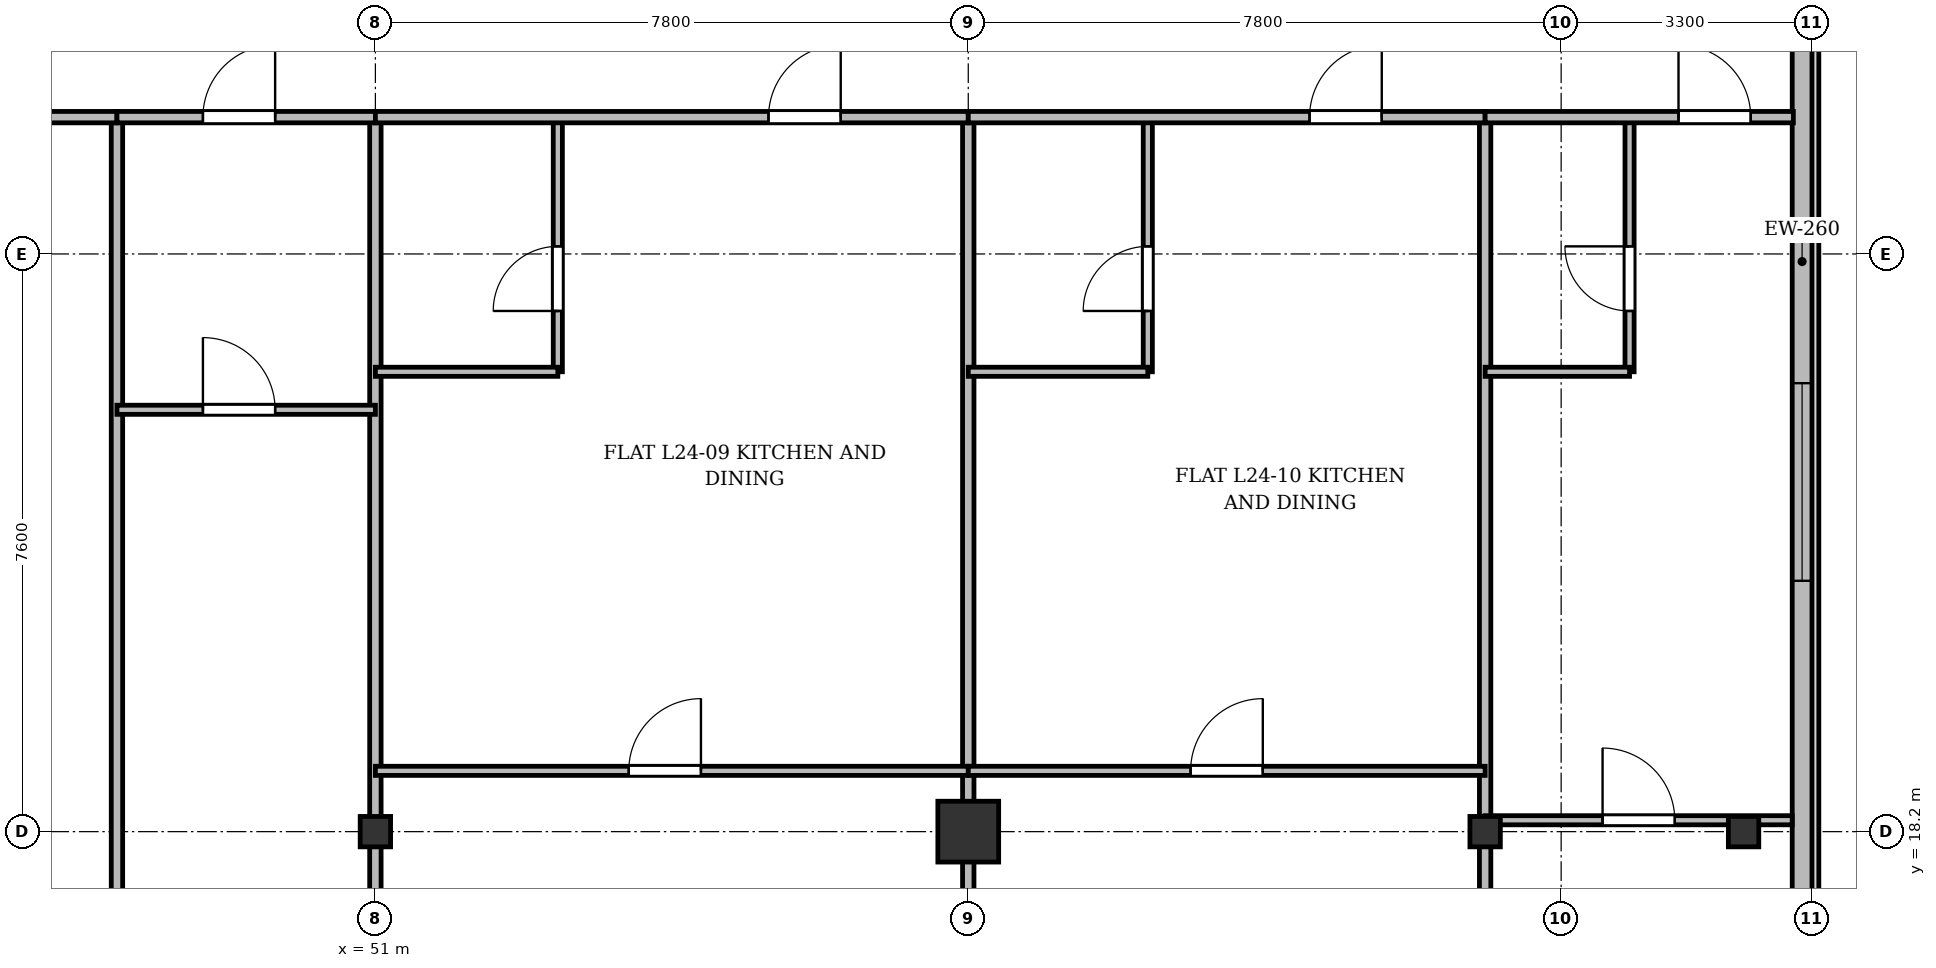
"""IFC4 building model, lengths in metres.
Left out: names, types, materials, properties, quantities, classifications, styles, units other than length and angle.
Written with IfcOpenShell. Run it as: python <this file> out.ifc"""

import sys

from ifc_helpers import new_model, si_unit, direction, frame, frame_2d, origin, origin_2d, place, context, subcontext, project, spatial, rectangle, i_section, extrude, source, transform, mapped, element, fill, save


model = new_model("IFC4")
c1 = context("Model", 3, precision=1e-05, world=origin(), true_north=direction((0.0, 1.0)))
c2 = subcontext(c1, "Body", "Model", "MODEL_VIEW")
j1 = project(units=[si_unit("LENGTHUNIT", "METRE"), si_unit("PLANEANGLEUNIT", "RADIAN")], contexts=[c1])
p1 = place(None, origin())
s1 = spatial("IfcSite", under=j1, at=p1, CompositionType="ELEMENT")
p2 = place(p1, origin())
s2 = spatial("IfcBuilding", under=s1, at=p2, CompositionType="ELEMENT")
p3 = place(p2, frame((0.0, 0.0, 96.1)))
s3 = spatial("IfcBuildingStorey", under=s2, at=p3, CompositionType="ELEMENT", Elevation=96.1)
m1 = source(origin(), c2, "Body", "SweptSolid", [
    extrude(i_section(OverallWidth=0.4, OverallDepth=0.4, WebThickness=0.022, FlangeThickness=0.035, at=origin_2d()), origin(), (0.0, 0.0, 1.0), 3.6),
])
p4 = place(p3, frame((51.0, 18.2, 0.0), z_axis=(0.0, 0.0, 1.0), x_axis=(1.0, 0.0, 0.0)))
e1 = element("IfcColumn", 1, at=p4, inside=s3, PredefinedType="COLUMN", context=c2, shape_type="MappedRepresentation", body=[
    mapped(m1, transform((0.0, 0.0, 0.0), x_axis=(1.0, 0.0, 0.0), y_axis=(0.0, 1.0, 0.0), z_axis=(0.0, 0.0, 1.0), scale=1.0)),
])
m2 = source(origin(), c2, "Body", "SweptSolid", [
    extrude(rectangle(XDim=0.8, YDim=0.8, at=origin_2d()), origin(), (0.0, 0.0, 1.0), 3.6),
])
p5 = place(p3, frame((58.8, 18.2, 0.0), z_axis=(0.0, 0.0, 1.0), x_axis=(1.0, 0.0, 0.0)))
e2 = element("IfcColumn", 2, at=p5, inside=s3, PredefinedType="COLUMN", context=c2, shape_type="MappedRepresentation", body=[
    mapped(m2, transform((0.0, 0.0, 0.0), x_axis=(1.0, 0.0, 0.0), y_axis=(0.0, 1.0, 0.0), z_axis=(0.0, 0.0, 1.0), scale=1.0)),
])
for number, where, z_axis, x_axis in (
    (3, (65.6, 18.2, 0.0), (0.0, 0.0, 1.0), (1.0, 0.0, 0.0)),
    (4, (69.0, 18.2, 0.0), (0.0, 0.0, 1.0), (1.0, 0.0, 0.0)),
):
    element("IfcColumn", number, at=place(p3, frame(where, z_axis=z_axis, x_axis=x_axis)), inside=s3, PredefinedType="COLUMN", context=c2, shape_type="MappedRepresentation", body=[
        mapped(m1, transform((0.0, 0.0, 0.0), x_axis=(1.0, 0.0, 0.0), y_axis=(0.0, 1.0, 0.0), z_axis=(0.0, 0.0, 1.0), scale=1.0)),
    ])
p6 = place(p3, frame((69.77, 45.5, 0.0), z_axis=(0.0, 0.0, 1.0), x_axis=(0.0, -1.0, 0.0)))
e5 = element("IfcWall", 5, at=p6, inside=s3, PredefinedType="SOLIDWALL", context=c2, shape_type="SweptSolid", body=[
    extrude(rectangle(XDim=39.6, YDim=0.26, at=frame_2d((19.8, 0.0))), origin(), (0.0, 0.0, 1.0), 3.34),
])
p7 = place(p6, frame((36.95, 0.0, 0.92)))
e6 = element("IfcOpeningElement", 6, at=p7, cuts=e5, PredefinedType="OPENING", context=c2, shape_type="SweptSolid", body=[
    extrude(rectangle(XDim=1.2, YDim=1.65, at=frame_2d((0.6, 0.825))), frame((0.0, 0.14, 0.0), z_axis=(0.0, -1.0, 0.0), x_axis=(1.0, 0.0, 0.0)), (0.0, 0.0, 1.0), 0.28),
])
p8 = place(p6, frame((32.8, 0.0, 0.92)))
e7 = element("IfcOpeningElement", 7, at=p8, cuts=e5, PredefinedType="OPENING", context=c2, shape_type="SweptSolid", body=[
    extrude(rectangle(XDim=2.6, YDim=1.9, at=frame_2d((1.3, 0.95))), frame((0.0, 0.14, 0.0), z_axis=(0.0, -1.0, 0.0), x_axis=(1.0, 0.0, 0.0)), (0.0, 0.0, 1.0), 0.28),
])
p9 = place(p6, frame((28.6, 0.0, 0.92)))
e8 = element("IfcOpeningElement", 8, at=p9, cuts=e5, PredefinedType="OPENING", context=c2, shape_type="SweptSolid", body=[
    extrude(rectangle(XDim=2.6, YDim=1.9, at=frame_2d((1.3, 0.95))), frame((0.0, 0.14, 0.0), z_axis=(0.0, -1.0, 0.0), x_axis=(1.0, 0.0, 0.0)), (0.0, 0.0, 1.0), 0.28),
])
p10 = place(p6, frame((21.4, 0.0, 0.92)))
e9 = element("IfcOpeningElement", 9, at=p10, cuts=e5, PredefinedType="OPENING", context=c2, shape_type="SweptSolid", body=[
    extrude(rectangle(XDim=2.6, YDim=1.9, at=frame_2d((1.3, 0.95))), frame((0.0, 0.14, 0.0), z_axis=(0.0, -1.0, 0.0), x_axis=(1.0, 0.0, 0.0)), (0.0, 0.0, 1.0), 0.28),
])
p11 = place(p6, frame((7.4, 0.0, 0.92)))
e10 = element("IfcOpeningElement", 10, at=p11, cuts=e5, PredefinedType="OPENING", context=c2, shape_type="SweptSolid", body=[
    extrude(rectangle(XDim=2.6, YDim=1.9, at=frame_2d((1.3, 0.95))), frame((0.0, 0.14, 0.0), z_axis=(0.0, -1.0, 0.0), x_axis=(1.0, 0.0, 0.0)), (0.0, 0.0, 1.0), 0.28),
])
p12 = place(p6, frame((4.5, 0.0, 0.92)))
e11 = element("IfcOpeningElement", 11, at=p12, cuts=e5, PredefinedType="OPENING", context=c2, shape_type="SweptSolid", body=[
    extrude(rectangle(XDim=1.2, YDim=1.65, at=frame_2d((0.6, 0.825))), frame((0.0, 0.14, 0.0), z_axis=(0.0, -1.0, 0.0), x_axis=(1.0, 0.0, 0.0)), (0.0, 0.0, 1.0), 0.28),
])
p13 = place(p6, frame((1.15, 0.0, 0.92)))
e12 = element("IfcOpeningElement", 12, at=p13, cuts=e5, PredefinedType="OPENING", context=c2, shape_type="SweptSolid", body=[
    extrude(rectangle(XDim=1.2, YDim=1.65, at=frame_2d((0.6, 0.825))), frame((0.0, 0.14, 0.0), z_axis=(0.0, -1.0, 0.0), x_axis=(1.0, 0.0, 0.0)), (0.0, 0.0, 1.0), 0.28),
])
p14 = place(p3, frame((47.6, 3.145, 0.0), z_axis=(0.0, 0.0, 1.0), x_axis=(0.0, 1.0, 0.0)))
e13 = element("IfcWall", 13, at=p14, inside=s3, PredefinedType="PARTITIONING", context=c2, shape_type="SweptSolid", body=[
    extrude(rectangle(XDim=24.455, YDim=0.15, at=frame_2d((12.228, 0.0))), origin(), (0.0, 0.0, 1.0), 2.752),
])
for number, where, z_axis, x_axis in (
    (14, (51.0, 3.145, 0.0), (0.0, 0.0, 1.0), (0.0, 1.0, 0.0)),
    (15, (58.8, 3.145, 0.0), (0.0, 0.0, 1.0), (0.0, 1.0, 0.0)),
    (16, (65.6, 3.145, 0.0), (0.0, 0.0, 1.0), (0.0, 1.0, 0.0)),
):
    element("IfcWall", number, at=place(p3, frame(where, z_axis=z_axis, x_axis=x_axis)), inside=s3, PredefinedType="PARTITIONING", context=c2, shape_type="SweptSolid", body=[
        extrude(rectangle(XDim=24.455, YDim=0.15, at=frame_2d((12.228, 0.0))), origin(), (0.0, 0.0, 1.0), 2.84),
    ])
p15 = place(p3, frame((43.8, 27.6, 0.0), z_axis=(0.0, 0.0, 1.0), x_axis=(1.0, 0.0, 0.0)))
e17 = element("IfcWall", 17, at=p15, inside=s3, PredefinedType="PARTITIONING", context=c2, shape_type="SweptSolid", body=[
    extrude(rectangle(XDim=3.8, YDim=0.15, at=frame_2d((1.9, 0.0))), origin(), (0.0, 0.0, 1.0), 2.84),
])
p16 = place(p15, frame((1.33, 0.0, 0.0)))
e18 = element("IfcOpeningElement", 18, at=p16, cuts=e17, PredefinedType="OPENING", context=c2, shape_type="SweptSolid", body=[
    extrude(rectangle(XDim=0.95, YDim=2.15, at=frame_2d((0.475, 1.075))), frame((0.0, 0.085, 0.0), z_axis=(0.0, -1.0, 0.0), x_axis=(1.0, 0.0, 0.0)), (0.0, 0.0, 1.0), 0.17),
])
p17 = place(p3, frame((47.6, 27.6, 0.0), z_axis=(0.0, 0.0, 1.0), x_axis=(1.0, 0.0, 0.0)))
e19 = element("IfcWall", 19, at=p17, inside=s3, PredefinedType="PARTITIONING", context=c2, shape_type="SweptSolid", body=[
    extrude(rectangle(XDim=3.4, YDim=0.15, at=frame_2d((1.7, 0.0))), origin(), (0.0, 0.0, 1.0), 2.84),
])
p18 = place(p17, frame((1.131, 0.0, 0.0)))
e20 = element("IfcOpeningElement", 20, at=p18, cuts=e19, PredefinedType="OPENING", context=c2, shape_type="SweptSolid", body=[
    extrude(rectangle(XDim=0.95, YDim=2.15, at=frame_2d((0.475, 1.075))), frame((0.0, 0.085, 0.0), z_axis=(0.0, -1.0, 0.0), x_axis=(1.0, 0.0, 0.0)), (0.0, 0.0, 1.0), 0.17),
])
p19 = place(p3, frame((47.6, 23.75, 0.0), z_axis=(0.0, 0.0, 1.0), x_axis=(1.0, 0.0, 0.0)))
e21 = element("IfcWall", 21, at=p19, inside=s3, PredefinedType="PARTITIONING", context=c2, shape_type="SweptSolid", body=[
    extrude(rectangle(XDim=3.4, YDim=0.12, at=frame_2d((1.7, 0.0))), origin(), (0.0, 0.0, 1.0), 2.84),
])
p20 = place(p19, frame((1.131, 0.0, 0.0)))
e22 = element("IfcOpeningElement", 22, at=p20, cuts=e21, PredefinedType="OPENING", context=c2, shape_type="SweptSolid", body=[
    extrude(rectangle(XDim=0.95, YDim=2.15, at=frame_2d((0.475, 1.075))), frame((0.0, 0.07, 0.0), z_axis=(0.0, -1.0, 0.0), x_axis=(1.0, 0.0, 0.0)), (0.0, 0.0, 1.0), 0.14),
])
p21 = place(p3, frame((51.0, 19.0, 0.0), z_axis=(0.0, 0.0, 1.0), x_axis=(1.0, 0.0, 0.0)))
e23 = element("IfcWall", 23, at=p21, inside=s3, PredefinedType="PARTITIONING", context=c2, shape_type="SweptSolid", body=[
    extrude(rectangle(XDim=7.8, YDim=0.12, at=frame_2d((3.9, 0.0))), origin(), (0.0, 0.0, 1.0), 2.84),
])
p22 = place(p21, frame((3.333, 0.0, 0.0)))
e24 = element("IfcOpeningElement", 24, at=p22, cuts=e23, PredefinedType="OPENING", context=c2, shape_type="SweptSolid", body=[
    extrude(rectangle(XDim=0.95, YDim=2.15, at=frame_2d((0.475, 1.075))), frame((0.0, 0.07, 0.0), z_axis=(0.0, -1.0, 0.0), x_axis=(1.0, 0.0, 0.0)), (0.0, 0.0, 1.0), 0.14),
])
p23 = place(p3, frame((53.4, 24.25, 0.0), z_axis=(0.0, 0.0, 1.0), x_axis=(0.0, 1.0, 0.0)))
e25 = element("IfcWall", 25, at=p23, inside=s3, PredefinedType="PARTITIONING", context=c2, shape_type="SweptSolid", body=[
    extrude(rectangle(XDim=3.35, YDim=0.12, at=frame_2d((1.675, 0.0))), origin(), (0.0, 0.0, 1.0), 2.99),
])
p24 = place(p23, frame((0.8, 0.0, 0.0)))
e26 = element("IfcOpeningElement", 26, at=p24, cuts=e25, PredefinedType="OPENING", context=c2, shape_type="SweptSolid", body=[
    extrude(rectangle(XDim=0.85, YDim=2.1, at=frame_2d((0.425, 1.05))), frame((0.0, 0.07, 0.0), z_axis=(0.0, -1.0, 0.0), x_axis=(1.0, 0.0, 0.0)), (0.0, 0.0, 1.0), 0.14),
])
p25 = place(p3, frame((51.0, 24.25, 0.0), z_axis=(0.0, 0.0, 1.0), x_axis=(1.0, 0.0, 0.0)))
e27 = element("IfcWall", 27, at=p25, inside=s3, PredefinedType="PARTITIONING", context=c2, shape_type="SweptSolid", body=[
    extrude(rectangle(XDim=2.4, YDim=0.12, at=frame_2d((1.2, 0.0))), origin(), (0.0, 0.0, 1.0), 2.84),
])
p26 = place(p3, frame((51.0, 27.6, 0.0), z_axis=(0.0, 0.0, 1.0), x_axis=(1.0, 0.0, 0.0)))
e28 = element("IfcWall", 28, at=p26, inside=s3, PredefinedType="PARTITIONING", context=c2, shape_type="SweptSolid", body=[
    extrude(rectangle(XDim=7.8, YDim=0.15, at=frame_2d((3.9, 0.0))), origin(), (0.0, 0.0, 1.0), 2.84),
])
p27 = place(p26, frame((5.172, 0.0, 0.0)))
e29 = element("IfcOpeningElement", 29, at=p27, cuts=e28, PredefinedType="OPENING", context=c2, shape_type="SweptSolid", body=[
    extrude(rectangle(XDim=0.95, YDim=2.15, at=frame_2d((0.475, 1.075))), frame((0.0, 0.085, 0.0), z_axis=(0.0, -1.0, 0.0), x_axis=(1.0, 0.0, 0.0)), (0.0, 0.0, 1.0), 0.17),
])
p28 = place(p3, frame((58.8, 19.0, 0.0), z_axis=(0.0, 0.0, 1.0), x_axis=(1.0, 0.0, 0.0)))
e30 = element("IfcWall", 30, at=p28, inside=s3, PredefinedType="PARTITIONING", context=c2, shape_type="SweptSolid", body=[
    extrude(rectangle(XDim=6.8, YDim=0.12, at=frame_2d((3.4, 0.0))), origin(), (0.0, 0.0, 1.0), 2.84),
])
p29 = place(p28, frame((2.925, 0.0, 0.0)))
e31 = element("IfcOpeningElement", 31, at=p29, cuts=e30, PredefinedType="OPENING", context=c2, shape_type="SweptSolid", body=[
    extrude(rectangle(XDim=0.95, YDim=2.15, at=frame_2d((0.475, 1.075))), frame((0.0, 0.07, 0.0), z_axis=(0.0, -1.0, 0.0), x_axis=(1.0, 0.0, 0.0)), (0.0, 0.0, 1.0), 0.14),
])
p30 = place(p3, frame((61.162, 24.25, 0.0), z_axis=(0.0, 0.0, 1.0), x_axis=(0.0, 1.0, 0.0)))
e32 = element("IfcWall", 32, at=p30, inside=s3, PredefinedType="PARTITIONING", context=c2, shape_type="SweptSolid", body=[
    extrude(rectangle(XDim=3.35, YDim=0.12, at=frame_2d((1.675, 0.0))), origin(), (0.0, 0.0, 1.0), 2.99),
])
p31 = place(p30, frame((0.8, 0.0, 0.0)))
e33 = element("IfcOpeningElement", 33, at=p31, cuts=e32, PredefinedType="OPENING", context=c2, shape_type="SweptSolid", body=[
    extrude(rectangle(XDim=0.85, YDim=2.1, at=frame_2d((0.425, 1.05))), frame((0.0, 0.07, 0.0), z_axis=(0.0, -1.0, 0.0), x_axis=(1.0, 0.0, 0.0)), (0.0, 0.0, 1.0), 0.14),
])
p32 = place(p3, frame((58.8, 24.25, 0.0), z_axis=(0.0, 0.0, 1.0), x_axis=(1.0, 0.0, 0.0)))
e34 = element("IfcWall", 34, at=p32, inside=s3, PredefinedType="PARTITIONING", context=c2, shape_type="SweptSolid", body=[
    extrude(rectangle(XDim=2.362, YDim=0.12, at=frame_2d((1.181, 0.0))), origin(), (0.0, 0.0, 1.0), 2.84),
])
p33 = place(p3, frame((58.8, 27.6, 0.0), z_axis=(0.0, 0.0, 1.0), x_axis=(1.0, 0.0, 0.0)))
e35 = element("IfcWall", 35, at=p33, inside=s3, PredefinedType="PARTITIONING", context=c2, shape_type="SweptSolid", body=[
    extrude(rectangle(XDim=6.8, YDim=0.15, at=frame_2d((3.4, 0.0))), origin(), (0.0, 0.0, 1.0), 2.84),
])
p34 = place(p33, frame((4.49, 0.0, 0.0)))
e36 = element("IfcOpeningElement", 36, at=p34, cuts=e35, PredefinedType="OPENING", context=c2, shape_type="SweptSolid", body=[
    extrude(rectangle(XDim=0.95, YDim=2.15, at=frame_2d((0.475, 1.075))), frame((0.0, 0.085, 0.0), z_axis=(0.0, -1.0, 0.0), x_axis=(1.0, 0.0, 0.0)), (0.0, 0.0, 1.0), 0.17),
])
p35 = place(p3, frame((65.6, 18.35, 0.0), z_axis=(0.0, 0.0, 1.0), x_axis=(1.0, 0.0, 0.0)))
e37 = element("IfcWall", 37, at=p35, inside=s3, PredefinedType="PARTITIONING", context=c2, shape_type="SweptSolid", body=[
    extrude(rectangle(XDim=4.04, YDim=0.12, at=frame_2d((2.02, 0.0))), origin(), (0.0, 0.0, 1.0), 2.752),
])
p36 = place(p35, frame((1.545, 0.0, 0.0)))
e38 = element("IfcOpeningElement", 38, at=p36, cuts=e37, PredefinedType="OPENING", context=c2, shape_type="SweptSolid", body=[
    extrude(rectangle(XDim=0.95, YDim=2.15, at=frame_2d((0.475, 1.075))), frame((0.0, 0.07, 0.0), z_axis=(0.0, -1.0, 0.0), x_axis=(1.0, 0.0, 0.0)), (0.0, 0.0, 1.0), 0.14),
])
p37 = place(p3, frame((67.5, 24.25, 0.0), z_axis=(0.0, 0.0, 1.0), x_axis=(0.0, 1.0, 0.0)))
e39 = element("IfcWall", 39, at=p37, inside=s3, PredefinedType="PARTITIONING", context=c2, shape_type="SweptSolid", body=[
    extrude(rectangle(XDim=3.35, YDim=0.12, at=frame_2d((1.675, 0.0))), origin(), (0.0, 0.0, 1.0), 2.99),
])
p38 = place(p37, frame((0.8, 0.0, 0.0)))
e40 = element("IfcOpeningElement", 40, at=p38, cuts=e39, PredefinedType="OPENING", context=c2, shape_type="SweptSolid", body=[
    extrude(rectangle(XDim=0.85, YDim=2.1, at=frame_2d((0.425, 1.05))), frame((0.0, 0.07, 0.0), z_axis=(0.0, -1.0, 0.0), x_axis=(1.0, 0.0, 0.0)), (0.0, 0.0, 1.0), 0.14),
])
p39 = place(p3, frame((65.6, 24.25, 0.0), z_axis=(0.0, 0.0, 1.0), x_axis=(1.0, 0.0, 0.0)))
e41 = element("IfcWall", 41, at=p39, inside=s3, PredefinedType="PARTITIONING", context=c2, shape_type="SweptSolid", body=[
    extrude(rectangle(XDim=1.9, YDim=0.12, at=frame_2d((0.95, 0.0))), origin(), (0.0, 0.0, 1.0), 2.84),
])
p40 = place(p3, frame((65.6, 27.6, 0.0), z_axis=(0.0, 0.0, 1.0), x_axis=(1.0, 0.0, 0.0)))
e42 = element("IfcWall", 42, at=p40, inside=s3, PredefinedType="PARTITIONING", context=c2, shape_type="SweptSolid", body=[
    extrude(rectangle(XDim=4.055, YDim=0.15, at=frame_2d((2.027, 0.0))), origin(), (0.0, 0.0, 1.0), 2.84),
])
p41 = place(p40, frame((2.544, 0.0, 0.0)))
e43 = element("IfcOpeningElement", 43, at=p41, cuts=e42, PredefinedType="OPENING", context=c2, shape_type="SweptSolid", body=[
    extrude(rectangle(XDim=0.95, YDim=2.15, at=frame_2d((0.475, 1.075))), frame((0.0, 0.085, 0.0), z_axis=(0.0, -1.0, 0.0), x_axis=(1.0, 0.0, 0.0)), (0.0, 0.0, 1.0), 0.17),
])
m3 = source(origin(), c2, "Body", "SweptSolid", [
    extrude(rectangle(XDim=2.6, YDim=1.9, at=frame_2d((1.3, 0.95))), frame((0.0, 0.03, 0.0), z_axis=(0.0, -1.0, 0.0), x_axis=(1.0, 0.0, 0.0)), (0.0, 0.0, 1.0), 0.06),
])
p42 = place(p10, origin())
e44 = element("IfcWindow", 44, at=p42, inside=s3, PartitioningType="SINGLE_PANEL", PredefinedType="WINDOW", context=c2, shape_type="MappedRepresentation", body=[
    mapped(m3, transform((0.0, 0.0, 0.0), x_axis=(1.0, 0.0, 0.0), y_axis=(0.0, 1.0, 0.0), z_axis=(0.0, 0.0, 1.0), scale=1.0)),
])
fill(e9, e44)
m4 = source(origin(), c2, "Body", "SweptSolid", [
    extrude(rectangle(XDim=0.95, YDim=2.15, at=frame_2d((0.475, 1.075))), frame((0.0, 0.025, 0.0), z_axis=(0.0, -1.0, 0.0), x_axis=(1.0, 0.0, 0.0)), (0.0, 0.0, 1.0), 0.05),
])
p43 = place(p18, origin())
e45 = element("IfcDoor", 45, at=p43, inside=s3, OperationType="SINGLE_SWING_RIGHT", PredefinedType="DOOR", context=c2, shape_type="MappedRepresentation", body=[
    mapped(m4, transform((0.0, 0.0, 0.0), x_axis=(1.0, 0.0, 0.0), y_axis=(0.0, 1.0, 0.0), z_axis=(0.0, 0.0, 1.0), scale=1.0)),
])
fill(e20, e45)
p44 = place(p20, origin())
e46 = element("IfcDoor", 46, at=p44, inside=s3, OperationType="SINGLE_SWING_LEFT", PredefinedType="DOOR", context=c2, shape_type="MappedRepresentation", body=[
    mapped(m4, transform((0.0, 0.0, 0.0), x_axis=(1.0, 0.0, 0.0), y_axis=(0.0, 1.0, 0.0), z_axis=(0.0, 0.0, 1.0), scale=1.0)),
])
fill(e22, e46)
p45 = place(p22, origin())
e47 = element("IfcDoor", 47, at=p45, inside=s3, OperationType="SINGLE_SWING_RIGHT", PredefinedType="DOOR", context=c2, shape_type="MappedRepresentation", body=[
    mapped(m4, transform((0.0, 0.0, 0.0), x_axis=(1.0, 0.0, 0.0), y_axis=(0.0, 1.0, 0.0), z_axis=(0.0, 0.0, 1.0), scale=1.0)),
])
fill(e24, e47)
m5 = source(origin(), c2, "Body", "SweptSolid", [
    extrude(rectangle(XDim=0.85, YDim=2.1, at=frame_2d((0.425, 1.05))), frame((0.0, 0.025, 0.0), z_axis=(0.0, -1.0, 0.0), x_axis=(1.0, 0.0, 0.0)), (0.0, 0.0, 1.0), 0.05),
])
p46 = place(p24, origin())
e48 = element("IfcDoor", 48, at=p46, inside=s3, OperationType="SINGLE_SWING_LEFT", PredefinedType="DOOR", context=c2, shape_type="MappedRepresentation", body=[
    mapped(m5, transform((0.0, 0.0, 0.0), x_axis=(1.0, 0.0, 0.0), y_axis=(0.0, 1.0, 0.0), z_axis=(0.0, 0.0, 1.0), scale=1.0)),
])
fill(e26, e48)
p47 = place(p27, origin())
e49 = element("IfcDoor", 49, at=p47, inside=s3, OperationType="SINGLE_SWING_RIGHT", PredefinedType="DOOR", context=c2, shape_type="MappedRepresentation", body=[
    mapped(m4, transform((0.0, 0.0, 0.0), x_axis=(1.0, 0.0, 0.0), y_axis=(0.0, 1.0, 0.0), z_axis=(0.0, 0.0, 1.0), scale=1.0)),
])
fill(e29, e49)
p48 = place(p29, origin())
e50 = element("IfcDoor", 50, at=p48, inside=s3, OperationType="SINGLE_SWING_RIGHT", PredefinedType="DOOR", context=c2, shape_type="MappedRepresentation", body=[
    mapped(m4, transform((0.0, 0.0, 0.0), x_axis=(1.0, 0.0, 0.0), y_axis=(0.0, 1.0, 0.0), z_axis=(0.0, 0.0, 1.0), scale=1.0)),
])
fill(e31, e50)
p49 = place(p31, origin())
e51 = element("IfcDoor", 51, at=p49, inside=s3, OperationType="SINGLE_SWING_LEFT", PredefinedType="DOOR", context=c2, shape_type="MappedRepresentation", body=[
    mapped(m5, transform((0.0, 0.0, 0.0), x_axis=(1.0, 0.0, 0.0), y_axis=(0.0, 1.0, 0.0), z_axis=(0.0, 0.0, 1.0), scale=1.0)),
])
fill(e33, e51)
p50 = place(p34, origin())
e52 = element("IfcDoor", 52, at=p50, inside=s3, OperationType="SINGLE_SWING_RIGHT", PredefinedType="DOOR", context=c2, shape_type="MappedRepresentation", body=[
    mapped(m4, transform((0.0, 0.0, 0.0), x_axis=(1.0, 0.0, 0.0), y_axis=(0.0, 1.0, 0.0), z_axis=(0.0, 0.0, 1.0), scale=1.0)),
])
fill(e36, e52)
p51 = place(p36, origin())
e53 = element("IfcDoor", 53, at=p51, inside=s3, OperationType="SINGLE_SWING_LEFT", PredefinedType="DOOR", context=c2, shape_type="MappedRepresentation", body=[
    mapped(m4, transform((0.0, 0.0, 0.0), x_axis=(1.0, 0.0, 0.0), y_axis=(0.0, 1.0, 0.0), z_axis=(0.0, 0.0, 1.0), scale=1.0)),
])
fill(e38, e53)
p52 = place(p38, origin())
e54 = element("IfcDoor", 54, at=p52, inside=s3, OperationType="SINGLE_SWING_RIGHT", PredefinedType="DOOR", context=c2, shape_type="MappedRepresentation", body=[
    mapped(m5, transform((0.0, 0.0, 0.0), x_axis=(1.0, 0.0, 0.0), y_axis=(0.0, 1.0, 0.0), z_axis=(0.0, 0.0, 1.0), scale=1.0)),
])
fill(e40, e54)
p53 = place(p41, origin())
e55 = element("IfcDoor", 55, at=p53, inside=s3, OperationType="SINGLE_SWING_LEFT", PredefinedType="DOOR", context=c2, shape_type="MappedRepresentation", body=[
    mapped(m4, transform((0.0, 0.0, 0.0), x_axis=(1.0, 0.0, 0.0), y_axis=(0.0, 1.0, 0.0), z_axis=(0.0, 0.0, 1.0), scale=1.0)),
])
fill(e43, e55)
save(model, sys.argv[1])
